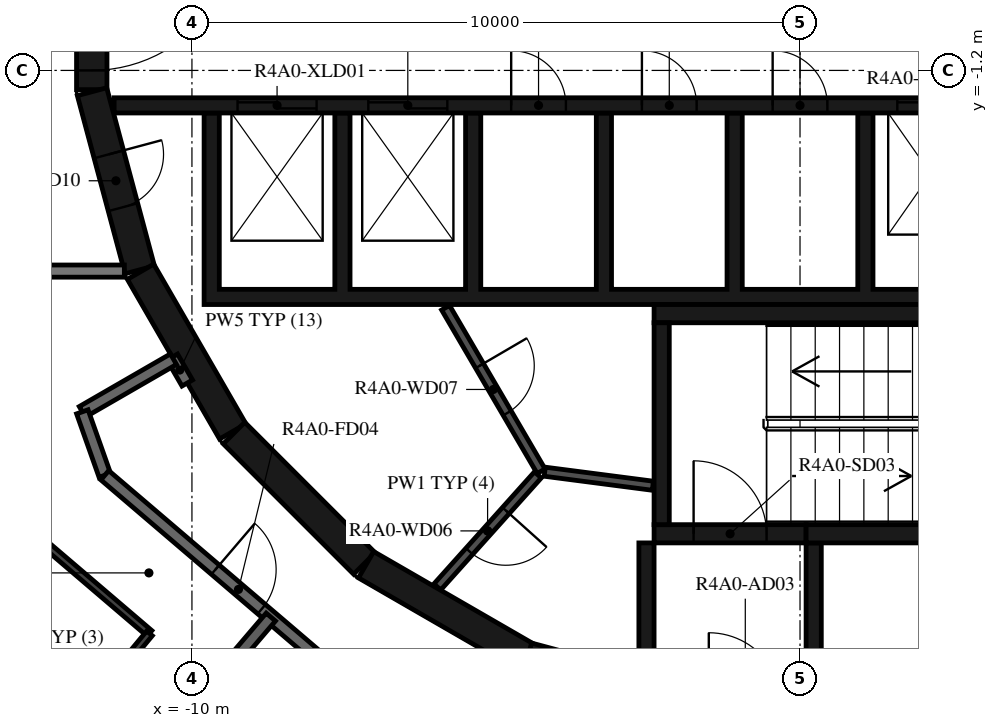
"""IFC4 building model, lengths in metres.
Left out: names, types, materials, properties, quantities, classifications, styles, units other than length and angle.
Written with IfcOpenShell. Run it as: python <this file> out.ifc"""

import sys

from ifc_helpers import new_model, si_unit, direction, frame, frame_2d, origin, place, context, subcontext, project, spatial, polyline, rectangle, outline, extrude, element, fill, save


model = new_model("IFC4")
c1 = context("Model", 3, precision=1e-05, world=origin(), true_north=direction((0.0, 1.0)))
c2 = subcontext(c1, "Body", "Model", "MODEL_VIEW")
j1 = project(units=[si_unit("LENGTHUNIT", "METRE"), si_unit("PLANEANGLEUNIT", "RADIAN")], contexts=[c1])
p1 = place(None, origin())
s1 = spatial("IfcSite", under=j1, at=p1, CompositionType="ELEMENT")
p2 = place(p1, origin())
s2 = spatial("IfcBuilding", under=s1, at=p2, CompositionType="ELEMENT")
p3 = place(p2, frame((0.0, 0.0, 158.7)))
s3 = spatial("IfcBuildingStorey", under=s2, at=p3, CompositionType="ELEMENT", Elevation=158.7)
p4 = place(p3, frame((1.55, -11.643, 0.0), z_axis=(0.0, 0.0, 1.0), x_axis=(0.965948410781, 0.258734743916, 0.0)))
e1 = element("IfcWall", 1, at=p4, inside=s3, PredefinedType="SHEAR", context=c2, shape_type="SweptSolid", body=[
    extrude(rectangle(XDim=3.033, YDim=0.5, at=frame_2d((1.516, 0.0))), origin(), (0.0, 0.0, 1.0), 3.12),
])
p5 = place(p3, frame((-11.647, 1.516, 0.0), z_axis=(0.0, 0.0, 1.0), x_axis=(0.0, -1.0, 0.0)))
e2 = element("IfcWall", 2, at=p5, inside=s3, PredefinedType="SHEAR", context=c2, shape_type="SweptSolid", body=[
    extrude(rectangle(XDim=3.033, YDim=0.5, at=frame_2d((1.516, 0.0))), origin(), (0.0, 0.0, 1.0), 3.12),
])
p6 = place(p5, frame((0.316, 0.0, 0.0)))
e3 = element("IfcOpeningElement", 3, at=p6, cuts=e2, PredefinedType="OPENING", context=c2, shape_type="SweptSolid", body=[
    extrude(rectangle(XDim=2.4, YDim=2.1, at=frame_2d((1.2, 1.05))), frame((0.0, 0.26, 0.0), z_axis=(0.0, -1.0, 0.0), x_axis=(1.0, 0.0, 0.0)), (0.0, 0.0, 1.0), 0.52),
])
p7 = place(p3, frame((-11.643, -1.55, 0.0), z_axis=(0.0, 0.0, 1.0), x_axis=(0.258734743916, -0.965948410781, 0.0)))
e4 = element("IfcWall", 4, at=p7, inside=s3, PredefinedType="SHEAR", context=c2, shape_type="SweptSolid", body=[
    extrude(rectangle(XDim=3.033, YDim=0.5, at=frame_2d((1.516, 0.0))), origin(), (0.0, 0.0, 1.0), 3.12),
])
p8 = place(p7, frame((1.066, 0.0, 0.0)))
e5 = element("IfcOpeningElement", 5, at=p8, cuts=e4, PredefinedType="OPENING", context=c2, shape_type="SweptSolid", body=[
    extrude(rectangle(XDim=0.9, YDim=2.1, at=frame_2d((0.45, 1.05))), frame((0.0, 0.26, 0.0), z_axis=(0.0, -1.0, 0.0), x_axis=(1.0, 0.0, 0.0)), (0.0, 0.0, 1.0), 0.52),
])
p9 = place(p3, frame((-10.845, -4.51, 0.0), z_axis=(0.0, 0.0, 1.0), x_axis=(0.500087131594, -0.865975092491, 0.0)))
e6 = element("IfcWall", 6, at=p9, inside=s3, PredefinedType="SHEAR", context=c2, shape_type="SweptSolid", body=[
    extrude(rectangle(XDim=3.033, YDim=0.5, at=frame_2d((1.516, 0.0))), origin(), (0.0, 0.0, 1.0), 3.12),
])
p10 = place(p3, frame((-9.308, -7.164, 0.0), z_axis=(0.0, 0.0, 1.0), x_axis=(0.707106781187, -0.707106781187, 0.0)))
e7 = element("IfcWall", 7, at=p10, inside=s3, PredefinedType="SHEAR", context=c2, shape_type="SweptSolid", body=[
    extrude(rectangle(XDim=3.032, YDim=0.5, at=frame_2d((1.516, 0.0))), origin(), (0.0, 0.0, 1.0), 3.12),
])
for number, where, z_axis, x_axis in (
    (8, (-7.137, -9.329, 0.0), (0.0, 0.0, 1.0), (0.866, -0.5, 0.0)),
    (9, (-4.479, -10.858, 0.0), (0.0, 0.0, 1.0), (0.966, -0.259, 0.0)),
):
    element("IfcWall", number, at=place(p3, frame(where, z_axis=z_axis, x_axis=x_axis)), inside=s3, PredefinedType="SHEAR", context=c2, shape_type="SweptSolid", body=[
        extrude(rectangle(XDim=3.033, YDim=0.5, at=frame_2d((1.516, 0.0))), origin(), (0.0, 0.0, 1.0), 3.12),
    ])
p11 = place(p3, frame((-2.275, -8.67, 0.0), z_axis=(0.0, 0.0, 1.0), x_axis=(0.0, 1.0, 0.0)))
e10 = element("IfcWall", 10, at=p11, inside=s3, PredefinedType="SHEAR", context=c2, shape_type="SweptSolid", body=[
    extrude(rectangle(XDim=3.32, YDim=0.25, at=frame_2d((1.66, 0.0))), origin(), (0.0, 0.0, 1.0), 3.12),
])
p12 = place(p3, frame((-2.4, -5.2, 0.0), z_axis=(0.0, 0.0, 1.0), x_axis=(1.0, 0.0, 0.0)))
e11 = element("IfcWall", 11, at=p12, inside=s3, PredefinedType="SHEAR", context=c2, shape_type="SweptSolid", body=[
    extrude(rectangle(XDim=7.05, YDim=0.3, at=frame_2d((3.525, 0.0))), origin(), (0.0, 0.0, 1.0), 3.12),
])
p13 = place(p3, frame((0.1, -8.82, 0.0), z_axis=(0.0, 0.0, 1.0), x_axis=(1.0, 0.0, 0.0)))
e12 = element("IfcWall", 12, at=p13, inside=s3, PredefinedType="SHEAR", context=c2, shape_type="SweptSolid", body=[
    extrude(rectangle(XDim=4.55, YDim=0.3, at=frame_2d((2.275, 0.0))), origin(), (0.0, 0.0, 1.0), 3.12),
])
p14 = place(p3, frame((-2.4, -8.82, 0.0), z_axis=(0.0, 0.0, 1.0), x_axis=(1.0, 0.0, 0.0)))
e13 = element("IfcWall", 13, at=p14, inside=s3, PredefinedType="SHEAR", context=c2, shape_type="SweptSolid", body=[
    extrude(rectangle(XDim=2.5, YDim=0.3, at=frame_2d((1.25, 0.0))), origin(), (0.0, 0.0, 1.0), 3.12),
])
p15 = place(p14, frame((0.65, 0.0, 0.0)))
e14 = element("IfcOpeningElement", 14, at=p15, cuts=e13, PredefinedType="OPENING", context=c2, shape_type="SweptSolid", body=[
    extrude(rectangle(XDim=1.2, YDim=2.1, at=frame_2d((0.6, 1.05))), frame((0.0, 0.16, 0.0), z_axis=(0.0, -1.0, 0.0), x_axis=(1.0, 0.0, 0.0)), (0.0, 0.0, 1.0), 0.32),
])
p16 = place(p3, frame((-2.525, -8.97, 0.0), z_axis=(0.0, 0.0, 1.0), x_axis=(0.0, -1.0, 0.0)))
e15 = element("IfcWall", 15, at=p16, inside=s3, PredefinedType="SHEAR", context=c2, shape_type="SweptSolid", body=[
    extrude(rectangle(XDim=2.11, YDim=0.25, at=frame_2d((1.055, 0.0))), origin(), (0.0, 0.0, 1.0), 3.12),
])
p17 = place(p3, frame((0.225, -8.97, 0.0), z_axis=(0.0, 0.0, 1.0), x_axis=(0.0, -1.0, 0.0)))
e16 = element("IfcWall", 16, at=p17, inside=s3, PredefinedType="SHEAR", context=c2, shape_type="SweptSolid", body=[
    extrude(rectangle(XDim=2.41, YDim=0.25, at=frame_2d((1.205, 0.0))), origin(), (0.0, 0.0, 1.0), 3.12),
])
p18 = place(p3, origin())
e17 = element("IfcWall", 17, at=p18, inside=s3, PredefinedType="SHEAR", context=c2, shape_type="SweptSolid", body=[
    extrude(outline(polyline([(9.8, -5.05), (9.8, -4.8), (9.8, -1.9), (9.55, -1.9), (9.55, -4.8), (7.65, -4.8), (7.65, -1.9), (7.4, -1.9), (7.4, -4.8), (5.5, -4.8), (5.5, -1.9), (5.25, -1.9), (5.25, -4.8), (3.35, -4.8), (3.35, -1.9), (3.1, -1.9), (3.1, -4.8), (1.2, -4.8), (1.2, -1.9), (0.95, -1.9), (0.95, -4.8), (-0.95, -4.8), (-0.95, -1.9), (-1.2, -1.9), (-1.2, -4.8), (-3.1, -4.8), (-3.1, -1.9), (-3.35, -1.9), (-3.35, -4.8), (-5.25, -4.8), (-5.25, -1.9), (-5.5, -1.9), (-5.5, -4.8), (-7.4, -4.8), (-7.4, -1.9), (-7.65, -1.9), (-7.65, -4.8), (-9.55, -4.8), (-9.55, -1.9), (-9.8, -1.9), (-9.8, -4.8), (-9.8, -5.05), (9.8, -5.05)])), origin(), (0.0, 0.0, 1.0), 3.12),
])
p19 = place(p3, frame((-11.28, -1.775, 0.0), z_axis=(0.0, 0.0, 1.0), x_axis=(1.0, 0.0, 0.0)))
e18 = element("IfcWall", 18, at=p19, inside=s3, PredefinedType="SHEAR", context=c2, shape_type="SweptSolid", body=[
    extrude(rectangle(XDim=14.38, YDim=0.25, at=frame_2d((7.19, 0.0))), origin(), (0.0, 0.0, 1.0), 3.12),
])
p20 = place(p19, frame((2.03, 0.0, 0.0)))
e19 = element("IfcOpeningElement", 19, at=p20, cuts=e18, PredefinedType="OPENING", context=c2, shape_type="SweptSolid", body=[
    extrude(rectangle(XDim=1.3, YDim=2.1, at=frame_2d((0.65, 1.05))), frame((0.0, 0.135, 0.0), z_axis=(0.0, -1.0, 0.0), x_axis=(1.0, 0.0, 0.0)), (0.0, 0.0, 1.0), 0.27),
])
p21 = place(p19, frame((4.18, 0.0, 0.0)))
e20 = element("IfcOpeningElement", 20, at=p21, cuts=e18, PredefinedType="OPENING", context=c2, shape_type="SweptSolid", body=[
    extrude(rectangle(XDim=1.3, YDim=2.1, at=frame_2d((0.65, 1.05))), frame((0.0, 0.135, 0.0), z_axis=(0.0, -1.0, 0.0), x_axis=(1.0, 0.0, 0.0)), (0.0, 0.0, 1.0), 0.27),
])
p22 = place(p19, frame((12.88, 0.0, 0.0)))
e21 = element("IfcOpeningElement", 21, at=p22, cuts=e18, PredefinedType="OPENING", context=c2, shape_type="SweptSolid", body=[
    extrude(rectangle(XDim=1.1, YDim=2.1, at=frame_2d((0.55, 1.05))), frame((0.0, 0.135, 0.0), z_axis=(0.0, -1.0, 0.0), x_axis=(1.0, 0.0, 0.0)), (0.0, 0.0, 1.0), 0.27),
])
p23 = place(p19, frame((6.53, 0.0, 0.0)))
e22 = element("IfcOpeningElement", 22, at=p23, cuts=e18, PredefinedType="OPENING", context=c2, shape_type="SweptSolid", body=[
    extrude(rectangle(XDim=0.9, YDim=2.1, at=frame_2d((0.45, 1.05))), frame((0.0, 0.135, 0.0), z_axis=(0.0, -1.0, 0.0), x_axis=(1.0, 0.0, 0.0)), (0.0, 0.0, 1.0), 0.27),
])
p24 = place(p19, frame((8.68, 0.0, 0.0)))
e23 = element("IfcOpeningElement", 23, at=p24, cuts=e18, PredefinedType="OPENING", context=c2, shape_type="SweptSolid", body=[
    extrude(rectangle(XDim=0.9, YDim=2.1, at=frame_2d((0.45, 1.05))), frame((0.0, 0.135, 0.0), z_axis=(0.0, -1.0, 0.0), x_axis=(1.0, 0.0, 0.0)), (0.0, 0.0, 1.0), 0.27),
])
p25 = place(p19, frame((10.83, 0.0, 0.0)))
e24 = element("IfcOpeningElement", 24, at=p25, cuts=e18, PredefinedType="OPENING", context=c2, shape_type="SweptSolid", body=[
    extrude(rectangle(XDim=0.9, YDim=2.1, at=frame_2d((0.45, 1.05))), frame((0.0, 0.135, 0.0), z_axis=(0.0, -1.0, 0.0), x_axis=(1.0, 0.0, 0.0)), (0.0, 0.0, 1.0), 0.27),
])
p26 = place(p3, frame((-5.829, -5.102, 0.0), z_axis=(0.0, 0.0, 1.0), x_axis=(0.504480008384, -0.863423373057, 0.0)))
e25 = element("IfcWall", 25, at=p26, inside=s3, PredefinedType="PARTITIONING", context=c2, shape_type="SweptSolid", body=[
    extrude(rectangle(XDim=3.115, YDim=0.15, at=frame_2d((1.558, 0.0))), origin(), (0.0, 0.0, 1.0), 3.12),
])
p27 = place(p26, frame((1.107, 0.0, 0.0)))
e26 = element("IfcOpeningElement", 26, at=p27, cuts=e25, PredefinedType="OPENING", context=c2, shape_type="SweptSolid", body=[
    extrude(rectangle(XDim=0.9, YDim=2.1, at=frame_2d((0.45, 1.05))), frame((0.0, 0.085, 0.0), z_axis=(0.0, -1.0, 0.0), x_axis=(1.0, 0.0, 0.0)), (0.0, 0.0, 1.0), 0.17),
])
p28 = place(p3, frame((-4.311, -7.851, 0.0), z_axis=(0.0, 0.0, 1.0), x_axis=(-0.667869133096, -0.744278725383, 0.0)))
e27 = element("IfcWall", 27, at=p28, inside=s3, PredefinedType="PARTITIONING", context=c2, shape_type="SweptSolid", body=[
    extrude(rectangle(XDim=2.476, YDim=0.15, at=frame_2d((1.238, 0.0))), origin(), (0.0, 0.0, 1.0), 3.12),
])
p29 = place(p28, frame((0.788, 0.0, 0.0)))
e28 = element("IfcOpeningElement", 28, at=p29, cuts=e27, PredefinedType="OPENING", context=c2, shape_type="SweptSolid", body=[
    extrude(rectangle(XDim=0.9, YDim=2.1, at=frame_2d((0.45, 1.05))), frame((0.0, 0.085, 0.0), z_axis=(0.0, -1.0, 0.0), x_axis=(1.0, 0.0, 0.0)), (0.0, 0.0, 1.0), 0.17),
])
p30 = place(p3, frame((-4.198, -7.799, 0.0), z_axis=(0.0, 0.0, 1.0), x_axis=(0.991686747293, -0.128675542523, 0.0)))
e29 = element("IfcWall", 29, at=p30, inside=s3, PredefinedType="PARTITIONING", context=c2, shape_type="SweptSolid", body=[
    extrude(rectangle(XDim=1.793, YDim=0.15, at=frame_2d((0.896, 0.0))), origin(), (0.0, 0.0, 1.0), 3.12),
])
p31 = place(p3, frame((-10.323, -5.914, 0.0), z_axis=(0.0, 0.0, 1.0), x_axis=(0.500137201729, -0.865946175837, 0.0)))
e30 = element("IfcWall", 30, at=p31, inside=s3, PredefinedType="STANDARD", context=c2, shape_type="SweptSolid", body=[
    extrude(rectangle(XDim=0.492, YDim=0.2, at=frame_2d((0.246, 0.0))), origin(), (0.0, 0.0, 1.0), 3.12),
])
p32 = place(p3, frame((-10.303, -5.949, 0.0), z_axis=(0.0, 0.0, 1.0), x_axis=(-0.866021168401, -0.500007335828, 0.0)))
e31 = element("IfcWall", 31, at=p32, inside=s3, PredefinedType="STANDARD", context=c2, shape_type="SweptSolid", body=[
    extrude(rectangle(XDim=1.731, YDim=0.2, at=frame_2d((0.865, 0.0))), origin(), (0.0, 0.0, 1.0), 3.12),
])
p33 = place(p3, frame((-11.802, -6.814, 0.0), z_axis=(0.0, 0.0, 1.0), x_axis=(0.333904297771, -0.942606980629, 0.0)))
e32 = element("IfcWall", 32, at=p33, inside=s3, PredefinedType="STANDARD", context=c2, shape_type="SweptSolid", body=[
    extrude(rectangle(XDim=1.107, YDim=0.2, at=frame_2d((0.553, 0.0))), origin(), (0.0, 0.0, 1.0), 3.12),
])
p34 = place(p3, frame((-11.433, -7.858, 0.0), z_axis=(0.0, 0.0, 1.0), x_axis=(0.760412154545, -0.649440801937, 0.0)))
e33 = element("IfcWall", 33, at=p34, inside=s3, PredefinedType="STANDARD", context=c2, shape_type="SweptSolid", body=[
    extrude(rectangle(XDim=7.181, YDim=0.2, at=frame_2d((3.59, 0.0))), origin(), (0.0, 0.0, 1.0), 3.12),
])
p35 = place(p34, frame((2.39, 0.0, 0.0)))
e34 = element("IfcOpeningElement", 34, at=p35, cuts=e33, PredefinedType="OPENING", context=c2, shape_type="SweptSolid", body=[
    extrude(rectangle(XDim=1.0, YDim=2.1, at=frame_2d((0.5, 1.05))), frame((0.0, 0.11, 0.0), z_axis=(0.0, -1.0, 0.0), x_axis=(1.0, 0.0, 0.0)), (0.0, 0.0, 1.0), 0.22),
])
p36 = place(p3, frame((-17.9, -4.5, 0.0), z_axis=(0.0, 0.0, 1.0), x_axis=(1.0, 0.0, 0.0)))
e35 = element("IfcWall", 35, at=p36, inside=s3, PredefinedType="STANDARD", context=c2, shape_type="SweptSolid", body=[
    extrude(rectangle(XDim=6.789, YDim=0.2, at=frame_2d((3.394, 0.0))), origin(), (0.0, 0.0, 1.0), 3.12),
])
p37 = place(p3, frame((-11.838, -13.86, 0.0), z_axis=(0.0, 0.0, 1.0), x_axis=(0.64944503311, 0.760408540831, 0.0)))
e36 = element("IfcWall", 36, at=p37, inside=s3, PredefinedType="STANDARD", context=c2, shape_type="SweptSolid", body=[
    extrude(rectangle(XDim=4.827, YDim=0.2, at=frame_2d((2.414, 0.0))), origin(), (0.0, 0.0, 1.0), 3.12),
])
p38 = place(p3, frame((-12.713, -8.737, 0.0), z_axis=(0.0, 0.0, 1.0), x_axis=(0.760400223405, -0.649454771517, 0.0)))
e37 = element("IfcWall", 37, at=p38, inside=s3, PredefinedType="PARTITIONING", context=c2, shape_type="SweptSolid", body=[
    extrude(rectangle(XDim=2.649, YDim=0.12, at=frame_2d((1.325, 0.0))), origin(), (0.0, 0.0, 1.0), 3.12),
])
p39 = place(p3, frame((-10.698, -10.458, 0.0), z_axis=(0.0, 0.0, 1.0), x_axis=(-0.63830561059, -0.769783052223, 0.0)))
e38 = element("IfcWall", 38, at=p39, inside=s3, PredefinedType="PARTITIONING", context=c2, shape_type="SweptSolid", body=[
    extrude(rectangle(XDim=5.131, YDim=0.12, at=frame_2d((2.565, 0.0))), origin(), (0.0, 0.0, 1.0), 3.12),
])
p40 = place(p39, frame((2.363, 0.0, 0.0)))
e39 = element("IfcOpeningElement", 39, at=p40, cuts=e38, PredefinedType="OPENING", context=c2, shape_type="SweptSolid", body=[
    extrude(rectangle(XDim=0.8, YDim=2.1, at=frame_2d((0.4, 1.05))), frame((0.0, 0.07, 0.0), z_axis=(0.0, -1.0, 0.0), x_axis=(1.0, 0.0, 0.0)), (0.0, 0.0, 1.0), 0.14),
])
p41 = place(p15, origin())
e40 = element("IfcDoor", 40, at=p41, inside=s3, OperationType="SINGLE_SWING_LEFT", PredefinedType="DOOR", context=c2, shape_type="SweptSolid", body=[
    extrude(rectangle(XDim=1.2, YDim=2.1, at=frame_2d((0.6, 1.05))), frame((0.0, 0.025, 0.0), z_axis=(0.0, -1.0, 0.0), x_axis=(1.0, 0.0, 0.0)), (0.0, 0.0, 1.0), 0.05),
])
fill(e14, e40)
p42 = place(p6, origin())
e41 = element("IfcDoor", 41, at=p42, inside=s3, OperationType="DOUBLE_DOOR_SINGLE_SWING", PredefinedType="DOOR", context=c2, shape_type="SweptSolid", body=[
    extrude(rectangle(XDim=2.4, YDim=2.1, at=frame_2d((1.2, 1.05))), frame((0.0, 0.025, 0.0), z_axis=(0.0, -1.0, 0.0), x_axis=(1.0, 0.0, 0.0)), (0.0, 0.0, 1.0), 0.05),
])
fill(e3, e41)
p43 = place(p20, origin())
e42 = element("IfcDoor", 42, at=p43, inside=s3, OperationType="DOUBLE_DOOR_SLIDING", PredefinedType="DOOR", context=c2, shape_type="SweptSolid", body=[
    extrude(rectangle(XDim=1.3, YDim=2.1, at=frame_2d((0.65, 1.05))), frame((0.0, 0.025, 0.0), z_axis=(0.0, -1.0, 0.0), x_axis=(1.0, 0.0, 0.0)), (0.0, 0.0, 1.0), 0.05),
])
fill(e19, e42)
p44 = place(p21, origin())
e43 = element("IfcDoor", 43, at=p44, inside=s3, OperationType="DOUBLE_DOOR_SLIDING", PredefinedType="DOOR", context=c2, shape_type="SweptSolid", body=[
    extrude(rectangle(XDim=1.3, YDim=2.1, at=frame_2d((0.65, 1.05))), frame((0.0, 0.025, 0.0), z_axis=(0.0, -1.0, 0.0), x_axis=(1.0, 0.0, 0.0)), (0.0, 0.0, 1.0), 0.05),
])
fill(e20, e43)
p45 = place(p22, origin())
e44 = element("IfcDoor", 44, at=p45, inside=s3, OperationType="DOUBLE_DOOR_SLIDING", PredefinedType="DOOR", context=c2, shape_type="SweptSolid", body=[
    extrude(rectangle(XDim=1.1, YDim=2.1, at=frame_2d((0.55, 1.05))), frame((0.0, 0.025, 0.0), z_axis=(0.0, -1.0, 0.0), x_axis=(1.0, 0.0, 0.0)), (0.0, 0.0, 1.0), 0.05),
])
fill(e21, e44)
p46 = place(p23, origin())
e45 = element("IfcDoor", 45, at=p46, inside=s3, OperationType="SINGLE_SWING_LEFT", PredefinedType="DOOR", context=c2, shape_type="SweptSolid", body=[
    extrude(rectangle(XDim=0.9, YDim=2.1, at=frame_2d((0.45, 1.05))), frame((0.0, 0.025, 0.0), z_axis=(0.0, -1.0, 0.0), x_axis=(1.0, 0.0, 0.0)), (0.0, 0.0, 1.0), 0.05),
])
fill(e22, e45)
p47 = place(p24, origin())
e46 = element("IfcDoor", 46, at=p47, inside=s3, OperationType="SINGLE_SWING_RIGHT", PredefinedType="DOOR", context=c2, shape_type="SweptSolid", body=[
    extrude(rectangle(XDim=0.9, YDim=2.1, at=frame_2d((0.45, 1.05))), frame((0.0, 0.025, 0.0), z_axis=(0.0, -1.0, 0.0), x_axis=(1.0, 0.0, 0.0)), (0.0, 0.0, 1.0), 0.05),
])
fill(e23, e46)
p48 = place(p25, origin())
e47 = element("IfcDoor", 47, at=p48, inside=s3, OperationType="SINGLE_SWING_LEFT", PredefinedType="DOOR", context=c2, shape_type="SweptSolid", body=[
    extrude(rectangle(XDim=0.9, YDim=2.1, at=frame_2d((0.45, 1.05))), frame((0.0, 0.025, 0.0), z_axis=(0.0, -1.0, 0.0), x_axis=(1.0, 0.0, 0.0)), (0.0, 0.0, 1.0), 0.05),
])
fill(e24, e47)
p49 = place(p29, origin())
e48 = element("IfcDoor", 48, at=p49, inside=s3, OperationType="SINGLE_SWING_RIGHT", PredefinedType="DOOR", context=c2, shape_type="SweptSolid", body=[
    extrude(rectangle(XDim=0.9, YDim=2.1, at=frame_2d((0.45, 1.05))), frame((0.0, 0.025, 0.0), z_axis=(0.0, -1.0, 0.0), x_axis=(1.0, 0.0, 0.0)), (0.0, 0.0, 1.0), 0.05),
])
fill(e28, e48)
p50 = place(p27, origin())
e49 = element("IfcDoor", 49, at=p50, inside=s3, OperationType="SINGLE_SWING_LEFT", PredefinedType="DOOR", context=c2, shape_type="SweptSolid", body=[
    extrude(rectangle(XDim=0.9, YDim=2.1, at=frame_2d((0.45, 1.05))), frame((0.0, 0.025, 0.0), z_axis=(0.0, -1.0, 0.0), x_axis=(1.0, 0.0, 0.0)), (0.0, 0.0, 1.0), 0.05),
])
fill(e26, e49)
p51 = place(p8, origin())
e50 = element("IfcDoor", 50, at=p51, inside=s3, OperationType="SINGLE_SWING_RIGHT", PredefinedType="DOOR", context=c2, shape_type="SweptSolid", body=[
    extrude(rectangle(XDim=0.9, YDim=2.1, at=frame_2d((0.45, 1.05))), frame((0.0, 0.025, 0.0), z_axis=(0.0, -1.0, 0.0), x_axis=(1.0, 0.0, 0.0)), (0.0, 0.0, 1.0), 0.05),
])
fill(e5, e50)
p52 = place(p35, origin())
e51 = element("IfcDoor", 51, at=p52, inside=s3, OperationType="SINGLE_SWING_RIGHT", PredefinedType="DOOR", context=c2, shape_type="SweptSolid", body=[
    extrude(rectangle(XDim=1.0, YDim=2.1, at=frame_2d((0.5, 1.05))), frame((0.0, 0.025, 0.0), z_axis=(0.0, -1.0, 0.0), x_axis=(1.0, 0.0, 0.0)), (0.0, 0.0, 1.0), 0.05),
])
fill(e34, e51)
save(model, sys.argv[1])
